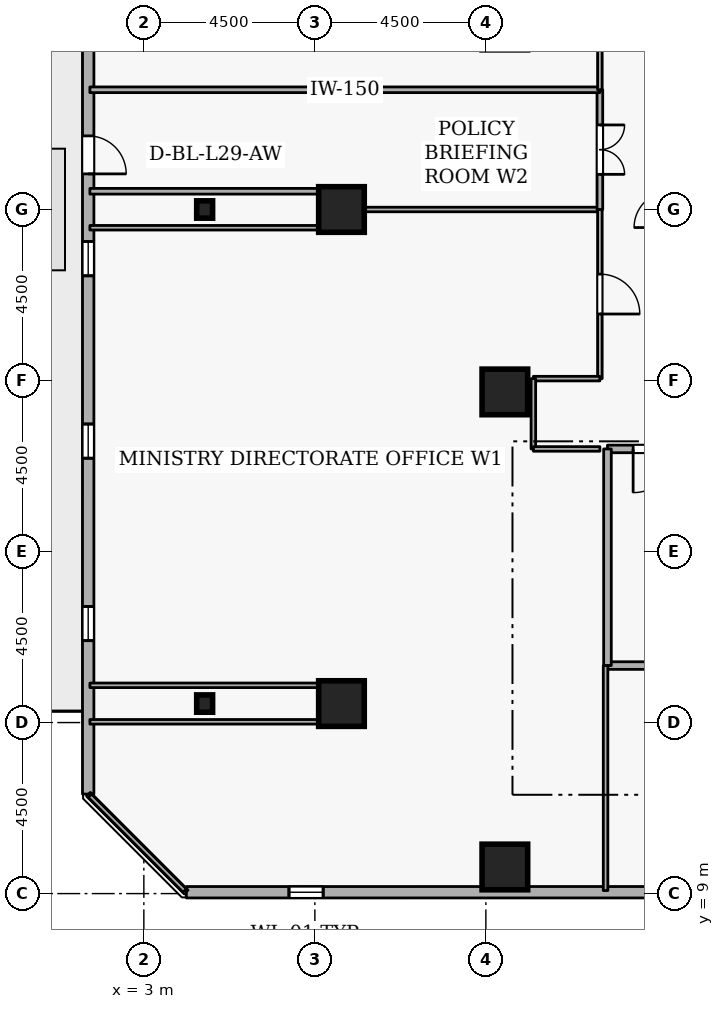
"""IFC4 building model, lengths in metres.
Left out: names, types, materials, properties, quantities, classifications, styles, units other than length and angle.
Written with IfcOpenShell. Run it as: python <this file> out.ifc"""

import sys

from ifc_helpers import new_model, si_unit, direction, frame, frame_2d, origin, origin_2d, place, context, subcontext, project, spatial, rectangle, i_section, extrude, element, fill, save


model = new_model("IFC4")
c1 = context("Model", 3, precision=1e-05, world=origin(), true_north=direction((0.0, 1.0)))
c2 = subcontext(c1, "Body", "Model", "MODEL_VIEW")
j1 = project(units=[si_unit("LENGTHUNIT", "METRE"), si_unit("PLANEANGLEUNIT", "RADIAN")], contexts=[c1])
p1 = place(None, origin())
s1 = spatial("IfcSite", under=j1, at=p1, CompositionType="ELEMENT")
p2 = place(p1, origin())
s2 = spatial("IfcBuilding", under=s1, at=p2, CompositionType="ELEMENT")
p3 = place(p2, frame((0.0, 0.0, 112.5)))
s3 = spatial("IfcBuildingStorey", under=s2, at=p3, CompositionType="ELEMENT", Elevation=112.5)
for number, where, z_axis, x_axis in (
    (1, (12.5, 9.7, 0.0), (0.0, 0.0, 1.0), (1.0, 0.0, 0.0)),
    (2, (8.2, 14.0, 0.0), (0.0, 0.0, 1.0), (1.0, 0.0, 0.0)),
    (3, (8.2, 27.0, 0.0), (0.0, 0.0, 1.0), (1.0, 0.0, 0.0)),
    (4, (12.5, 22.2, 0.0), (0.0, 0.0, 1.0), (1.0, 0.0, 0.0)),
):
    element("IfcColumn", number, at=place(p3, frame(where, z_axis=z_axis, x_axis=x_axis)), inside=s3, PredefinedType="COLUMN", context=c2, shape_type="SweptSolid", body=[
        extrude(rectangle(XDim=1.2, YDim=1.2, at=origin_2d()), origin(), (0.0, 0.0, 1.0), 3.6),
    ])
for number, where, z_axis, x_axis in (
    (5, (4.6, 14.0, 0.0), (0.0, 0.0, 1.0), (1.0, 0.0, 0.0)),
    (6, (4.6, 27.0, 0.0), (0.0, 0.0, 1.0), (1.0, 0.0, 0.0)),
):
    element("IfcColumn", number, at=place(p3, frame(where, z_axis=z_axis, x_axis=x_axis)), inside=s3, PredefinedType="COLUMN", context=c2, shape_type="SweptSolid", body=[
        extrude(i_section(OverallWidth=0.418, OverallDepth=0.456, WebThickness=0.042, FlangeThickness=0.067, FilletRadius=0.015, at=origin_2d()), origin(), (0.0, 0.0, 1.0), 3.6),
    ])
p4 = place(p3, frame((4.119, 9.035, 0.0), z_axis=(0.0, 0.0, 1.0), x_axis=(0.999999999641, 2.6801568e-05, 0.0)))
e7 = element("IfcWall", 7, at=p4, inside=s3, PredefinedType="STANDARD", context=c2, shape_type="SweptSolid", body=[
    extrude(rectangle(XDim=36.437, YDim=0.3, at=frame_2d((18.218, 0.0))), origin(), (0.0, 0.0, 1.0), 2.7),
])
p5 = place(p4, frame((2.7, 0.0, 0.72)))
e8 = element("IfcOpeningElement", 8, at=p5, cuts=e7, PredefinedType="OPENING", context=c2, shape_type="SweptSolid", body=[
    extrude(rectangle(XDim=0.9, YDim=1.75, at=frame_2d((0.45, 0.875))), frame((0.0, 0.16, 0.0), z_axis=(0.0, -1.0, 0.0), x_axis=(1.0, 0.0, 0.0)), (0.0, 0.0, 1.0), 0.32),
])
p6 = place(p4, frame((12.3, 0.0, 0.72)))
e9 = element("IfcOpeningElement", 9, at=p6, cuts=e7, PredefinedType="OPENING", context=c2, shape_type="SweptSolid", body=[
    extrude(rectangle(XDim=0.9, YDim=1.75, at=frame_2d((0.45, 0.875))), frame((0.0, 0.16, 0.0), z_axis=(0.0, -1.0, 0.0), x_axis=(1.0, 0.0, 0.0)), (0.0, 0.0, 1.0), 0.32),
])
p7 = place(p4, frame((17.1, 0.0, 0.72)))
e10 = element("IfcOpeningElement", 10, at=p7, cuts=e7, PredefinedType="OPENING", context=c2, shape_type="SweptSolid", body=[
    extrude(rectangle(XDim=0.9, YDim=1.75, at=frame_2d((0.45, 0.875))), frame((0.0, 0.16, 0.0), z_axis=(0.0, -1.0, 0.0), x_axis=(1.0, 0.0, 0.0)), (0.0, 0.0, 1.0), 0.32),
])
p8 = place(p4, frame((26.7, 0.0, 0.72)))
e11 = element("IfcOpeningElement", 11, at=p8, cuts=e7, PredefinedType="OPENING", context=c2, shape_type="SweptSolid", body=[
    extrude(rectangle(XDim=0.9, YDim=1.75, at=frame_2d((0.45, 0.875))), frame((0.0, 0.16, 0.0), z_axis=(0.0, -1.0, 0.0), x_axis=(1.0, 0.0, 0.0)), (0.0, 0.0, 1.0), 0.32),
])
p9 = place(p4, frame((31.5, 0.0, 0.72)))
e12 = element("IfcOpeningElement", 12, at=p9, cuts=e7, PredefinedType="OPENING", context=c2, shape_type="SweptSolid", body=[
    extrude(rectangle(XDim=0.9, YDim=1.75, at=frame_2d((0.45, 0.875))), frame((0.0, 0.16, 0.0), z_axis=(0.0, -1.0, 0.0), x_axis=(1.0, 0.0, 0.0)), (0.0, 0.0, 1.0), 0.32),
])
p10 = place(p3, frame((1.536, 48.055, 0.0), z_axis=(0.0, 0.0, 1.0), x_axis=(-2.6801568e-05, -0.999999999641, 0.0)))
e13 = element("IfcWall", 13, at=p10, inside=s3, PredefinedType="STANDARD", context=c2, shape_type="SweptSolid", body=[
    extrude(rectangle(XDim=36.437, YDim=0.3, at=frame_2d((18.218, 0.0))), origin(), (0.0, 0.0, 1.0), 2.7),
])
p11 = place(p10, frame((19.118, 0.0, 0.0)))
e14 = element("IfcOpeningElement", 14, at=p11, cuts=e13, PredefinedType="OPENING", context=c2, shape_type="SweptSolid", body=[
    extrude(rectangle(XDim=1.0, YDim=2.08, at=frame_2d((0.5, 1.04))), frame((0.0, 0.16, 0.0), z_axis=(0.0, -1.0, 0.0), x_axis=(1.0, 0.0, 0.0)), (0.0, 0.0, 1.0), 0.32),
])
p12 = place(p10, frame((2.7, 0.0, 0.72)))
e15 = element("IfcOpeningElement", 15, at=p12, cuts=e13, PredefinedType="OPENING", context=c2, shape_type="SweptSolid", body=[
    extrude(rectangle(XDim=0.9, YDim=1.75, at=frame_2d((0.45, 0.875))), frame((0.0, 0.16, 0.0), z_axis=(0.0, -1.0, 0.0), x_axis=(1.0, 0.0, 0.0)), (0.0, 0.0, 1.0), 0.32),
])
p13 = place(p10, frame((12.3, 0.0, 0.72)))
e16 = element("IfcOpeningElement", 16, at=p13, cuts=e13, PredefinedType="OPENING", context=c2, shape_type="SweptSolid", body=[
    extrude(rectangle(XDim=0.9, YDim=1.75, at=frame_2d((0.45, 0.875))), frame((0.0, 0.16, 0.0), z_axis=(0.0, -1.0, 0.0), x_axis=(1.0, 0.0, 0.0)), (0.0, 0.0, 1.0), 0.32),
])
p14 = place(p10, frame((21.9, 0.0, 0.72)))
e17 = element("IfcOpeningElement", 17, at=p14, cuts=e13, PredefinedType="OPENING", context=c2, shape_type="SweptSolid", body=[
    extrude(rectangle(XDim=0.9, YDim=1.75, at=frame_2d((0.45, 0.875))), frame((0.0, 0.16, 0.0), z_axis=(0.0, -1.0, 0.0), x_axis=(1.0, 0.0, 0.0)), (0.0, 0.0, 1.0), 0.32),
])
p15 = place(p10, frame((26.7, 0.0, 0.72)))
e18 = element("IfcOpeningElement", 18, at=p15, cuts=e13, PredefinedType="OPENING", context=c2, shape_type="SweptSolid", body=[
    extrude(rectangle(XDim=0.9, YDim=1.75, at=frame_2d((0.45, 0.875))), frame((0.0, 0.16, 0.0), z_axis=(0.0, -1.0, 0.0), x_axis=(1.0, 0.0, 0.0)), (0.0, 0.0, 1.0), 0.32),
])
p16 = place(p10, frame((31.5, 0.0, 0.72)))
e19 = element("IfcOpeningElement", 19, at=p16, cuts=e13, PredefinedType="OPENING", context=c2, shape_type="SweptSolid", body=[
    extrude(rectangle(XDim=0.9, YDim=1.75, at=frame_2d((0.45, 0.875))), frame((0.0, 0.16, 0.0), z_axis=(0.0, -1.0, 0.0), x_axis=(1.0, 0.0, 0.0)), (0.0, 0.0, 1.0), 0.32),
])
p17 = place(p3, frame((15.2, 15.0, 0.0), z_axis=(0.0, 0.0, 1.0), x_axis=(1.0, 0.0, 0.0)))
e20 = element("IfcWall", 20, at=p17, inside=s3, PredefinedType="STANDARD", context=c2, shape_type="SweptSolid", body=[
    extrude(rectangle(XDim=2.5, YDim=0.2, at=frame_2d((1.25, 0.0))), origin(), (0.0, 0.0, 1.0), 3.34),
])
p18 = place(p3, frame((17.7, 20.7, 0.0), z_axis=(0.0, 0.0, 1.0), x_axis=(-1.0, 0.0, 0.0)))
e21 = element("IfcWall", 21, at=p18, inside=s3, PredefinedType="STANDARD", context=c2, shape_type="SweptSolid", body=[
    extrude(rectangle(XDim=2.5, YDim=0.2, at=frame_2d((1.25, 0.0))), origin(), (0.0, 0.0, 1.0), 3.34),
])
p19 = place(p18, frame((0.675, 0.0, 0.0)))
e22 = element("IfcOpeningElement", 22, at=p19, cuts=e21, PredefinedType="OPENING", context=c2, shape_type="SweptSolid", body=[
    extrude(rectangle(XDim=1.15, YDim=2.1, at=frame_2d((0.575, 1.05))), frame((0.0, 0.11, 0.0), z_axis=(0.0, -1.0, 0.0), x_axis=(1.0, 0.0, 0.0)), (0.0, 0.0, 1.0), 0.22),
])
p20 = place(p3, frame((15.2, 20.7, 0.0), z_axis=(0.0, 0.0, 1.0), x_axis=(0.0, -1.0, 0.0)))
e23 = element("IfcWall", 23, at=p20, inside=s3, PredefinedType="STANDARD", context=c2, shape_type="SweptSolid", body=[
    extrude(rectangle(XDim=5.7, YDim=0.2, at=frame_2d((2.85, 0.0))), origin(), (0.0, 0.0, 1.0), 3.34),
])
for number, where, z_axis, x_axis in (
    (24, (1.58, 13.52, 0.0), (0.0, 0.0, 1.0), (1.0, 0.0, 0.0)),
    (25, (8.2, 14.48, 0.0), (0.0, 0.0, 1.0), (-1.0, 0.0, 0.0)),
    (26, (1.58, 26.52, 0.0), (0.0, 0.0, 1.0), (1.0, 0.0, 0.0)),
):
    element("IfcWall", number, at=place(p3, frame(where, z_axis=z_axis, x_axis=x_axis)), inside=s3, PredefinedType="PARTITIONING", context=c2, shape_type="SweptSolid", body=[
        extrude(rectangle(XDim=6.62, YDim=0.12, at=frame_2d((3.31, 0.0))), origin(), (0.0, 0.0, 1.0), 3.34),
    ])
p21 = place(p3, frame((8.2, 27.0, 0.0), z_axis=(0.0, 0.0, 1.0), x_axis=(1.0, 0.0, 0.0)))
e27 = element("IfcWall", 27, at=p21, inside=s3, PredefinedType="PARTITIONING", context=c2, shape_type="SweptSolid", body=[
    extrude(rectangle(XDim=6.8, YDim=0.12, at=frame_2d((3.4, 0.0))), origin(), (0.0, 0.0, 1.0), 2.882),
])
p22 = place(p3, frame((15.0, 27.0, 0.0), z_axis=(0.0, 0.0, 1.0), x_axis=(0.0, -1.0, 0.0)))
e28 = element("IfcWall", 28, at=p22, inside=s3, PredefinedType="PARTITIONING", context=c2, shape_type="SweptSolid", body=[
    extrude(rectangle(XDim=4.45, YDim=0.12, at=frame_2d((2.225, 0.0))), origin(), (0.0, 0.0, 1.0), 3.34),
])
p23 = place(p22, frame((1.7, 0.0, 0.0)))
e29 = element("IfcOpeningElement", 29, at=p23, cuts=e28, PredefinedType="OPENING", context=c2, shape_type="SweptSolid", body=[
    extrude(rectangle(XDim=1.05, YDim=2.1, at=frame_2d((0.525, 1.05))), frame((0.0, 0.07, 0.0), z_axis=(0.0, -1.0, 0.0), x_axis=(1.0, 0.0, 0.0)), (0.0, 0.0, 1.0), 0.14),
])
p24 = place(p3, frame((15.0, 22.55, 0.0), z_axis=(0.0, 0.0, 1.0), x_axis=(-1.0, 0.0, 0.0)))
e30 = element("IfcWall", 30, at=p24, inside=s3, PredefinedType="PARTITIONING", context=c2, shape_type="SweptSolid", body=[
    extrude(rectangle(XDim=1.75, YDim=0.12, at=frame_2d((0.875, 0.0))), origin(), (0.0, 0.0, 1.0), 3.34),
])
p25 = place(p3, frame((13.25, 22.55, 0.0), z_axis=(0.0, 0.0, 1.0), x_axis=(0.0, -1.0, 0.0)))
e31 = element("IfcWall", 31, at=p25, inside=s3, PredefinedType="PARTITIONING", context=c2, shape_type="SweptSolid", body=[
    extrude(rectangle(XDim=1.85, YDim=0.12, at=frame_2d((0.925, 0.0))), origin(), (0.0, 0.0, 1.0), 3.34),
])
p26 = place(p3, frame((13.25, 20.7, 0.0), z_axis=(0.0, 0.0, 1.0), x_axis=(1.0, 0.0, 0.0)))
e32 = element("IfcWall", 32, at=p26, inside=s3, PredefinedType="PARTITIONING", context=c2, shape_type="SweptSolid", body=[
    extrude(rectangle(XDim=1.75, YDim=0.12, at=frame_2d((0.875, 0.0))), origin(), (0.0, 0.0, 1.0), 3.34),
])
p27 = place(p3, frame((15.15, 15.0, 0.0), z_axis=(0.0, 0.0, 1.0), x_axis=(0.0, -1.0, 0.0)))
e33 = element("IfcWall", 33, at=p27, inside=s3, PredefinedType="PARTITIONING", context=c2, shape_type="SweptSolid", body=[
    extrude(rectangle(XDim=5.92, YDim=0.12, at=frame_2d((2.96, 0.0))), origin(), (0.0, 0.0, 1.0), 3.34),
])
p28 = place(p3, frame((4.075, 9.08, 0.0), z_axis=(0.0, 0.0, 1.0), x_axis=(-0.707106781187, 0.707106781187, 0.0)))
e34 = element("IfcWall", 34, at=p28, inside=s3, PredefinedType="PARTITIONING", context=c2, shape_type="SweptSolid", body=[
    extrude(rectangle(XDim=3.528, YDim=0.12, at=frame_2d((1.764, 0.0))), origin(), (0.0, 0.0, 1.0), 3.34),
])
p29 = place(p3, frame((15.0, 30.15, 0.0), z_axis=(0.0, 0.0, 1.0), x_axis=(0.0, -1.0, 0.0)))
e35 = element("IfcWall", 35, at=p29, inside=s3, PredefinedType="PARTITIONING", context=c2, shape_type="SweptSolid", body=[
    extrude(rectangle(XDim=3.15, YDim=0.15, at=frame_2d((1.575, 0.0))), origin(), (0.0, 0.0, 1.0), 3.34),
])
p30 = place(p29, frame((0.925, 0.0, 0.0)))
e36 = element("IfcOpeningElement", 36, at=p30, cuts=e35, PredefinedType="OPENING", context=c2, shape_type="SweptSolid", body=[
    extrude(rectangle(XDim=1.3, YDim=2.12, at=frame_2d((0.65, 1.06))), frame((0.0, 0.085, 0.0), z_axis=(0.0, -1.0, 0.0), x_axis=(1.0, 0.0, 0.0)), (0.0, 0.0, 1.0), 0.17),
])
p31 = place(p3, frame((8.2, 27.48, 0.0), z_axis=(0.0, 0.0, 1.0), x_axis=(-1.0, 0.0, 0.0)))
e37 = element("IfcWall", 37, at=p31, inside=s3, PredefinedType="PARTITIONING", context=c2, shape_type="SweptSolid", body=[
    extrude(rectangle(XDim=6.62, YDim=0.15, at=frame_2d((3.31, 0.0))), origin(), (0.0, 0.0, 1.0), 3.34),
])
p32 = place(p3, frame((1.58, 30.15, 0.0), z_axis=(0.0, 0.0, 1.0), x_axis=(1.0, 0.0, 0.0)))
e38 = element("IfcWall", 38, at=p32, inside=s3, PredefinedType="PARTITIONING", context=c2, shape_type="SweptSolid", body=[
    extrude(rectangle(XDim=13.42, YDim=0.15, at=frame_2d((6.71, 0.0))), origin(), (0.0, 0.0, 1.0), 3.34),
])
p33 = place(p3, frame((15.0, 31.45, 0.0), z_axis=(0.0, 0.0, 1.0), x_axis=(0.0, -1.0, 0.0)))
e39 = element("IfcWall", 39, at=p33, inside=s3, PredefinedType="PARTITIONING", context=c2, shape_type="SweptSolid", body=[
    extrude(rectangle(XDim=1.3, YDim=0.12, at=frame_2d((0.65, 0.0))), origin(), (0.0, 0.0, 1.0), 3.34),
])
p34 = place(p5, origin())
e40 = element("IfcWindow", 40, at=p34, inside=s3, PartitioningType="SINGLE_PANEL", PredefinedType="WINDOW", context=c2, shape_type="SweptSolid", body=[
    extrude(rectangle(XDim=0.9, YDim=1.75, at=frame_2d((0.45, 0.875))), frame((0.0, 0.03, 0.0), z_axis=(0.0, -1.0, 0.0), x_axis=(1.0, 0.0, 0.0)), (0.0, 0.0, 1.0), 0.06),
])
fill(e8, e40)
p35 = place(p11, origin())
e41 = element("IfcDoor", 41, at=p35, inside=s3, OperationType="SINGLE_SWING_RIGHT", PredefinedType="DOOR", context=c2, shape_type="SweptSolid", body=[
    extrude(rectangle(XDim=1.0, YDim=2.08, at=frame_2d((0.5, 1.04))), frame((0.0, 0.025, 0.0), z_axis=(0.0, -1.0, 0.0), x_axis=(1.0, 0.0, 0.0)), (0.0, 0.0, 1.0), 0.05),
])
fill(e14, e41)
p36 = place(p14, origin())
e42 = element("IfcWindow", 42, at=p36, inside=s3, PartitioningType="SINGLE_PANEL", PredefinedType="WINDOW", context=c2, shape_type="SweptSolid", body=[
    extrude(rectangle(XDim=0.9, YDim=1.75, at=frame_2d((0.45, 0.875))), frame((0.0, 0.03, 0.0), z_axis=(0.0, -1.0, 0.0), x_axis=(1.0, 0.0, 0.0)), (0.0, 0.0, 1.0), 0.06),
])
fill(e17, e42)
p37 = place(p15, origin())
e43 = element("IfcWindow", 43, at=p37, inside=s3, PartitioningType="SINGLE_PANEL", PredefinedType="WINDOW", context=c2, shape_type="SweptSolid", body=[
    extrude(rectangle(XDim=0.9, YDim=1.75, at=frame_2d((0.45, 0.875))), frame((0.0, 0.03, 0.0), z_axis=(0.0, -1.0, 0.0), x_axis=(1.0, 0.0, 0.0)), (0.0, 0.0, 1.0), 0.06),
])
fill(e18, e43)
p38 = place(p16, origin())
e44 = element("IfcWindow", 44, at=p38, inside=s3, PartitioningType="SINGLE_PANEL", PredefinedType="WINDOW", context=c2, shape_type="SweptSolid", body=[
    extrude(rectangle(XDim=0.9, YDim=1.75, at=frame_2d((0.45, 0.875))), frame((0.0, 0.03, 0.0), z_axis=(0.0, -1.0, 0.0), x_axis=(1.0, 0.0, 0.0)), (0.0, 0.0, 1.0), 0.06),
])
fill(e19, e44)
p39 = place(p19, origin())
e45 = element("IfcDoor", 45, at=p39, inside=s3, OperationType="SINGLE_SWING_RIGHT", PredefinedType="DOOR", context=c2, shape_type="SweptSolid", body=[
    extrude(rectangle(XDim=1.15, YDim=2.1, at=frame_2d((0.575, 1.05))), frame((0.0, 0.025, 0.0), z_axis=(0.0, -1.0, 0.0), x_axis=(1.0, 0.0, 0.0)), (0.0, 0.0, 1.0), 0.05),
])
fill(e22, e45)
p40 = place(p23, origin())
e46 = element("IfcDoor", 46, at=p40, inside=s3, OperationType="SINGLE_SWING_RIGHT", PredefinedType="DOOR", context=c2, shape_type="SweptSolid", body=[
    extrude(rectangle(XDim=1.05, YDim=2.1, at=frame_2d((0.525, 1.05))), frame((0.0, 0.025, 0.0), z_axis=(0.0, -1.0, 0.0), x_axis=(1.0, 0.0, 0.0)), (0.0, 0.0, 1.0), 0.05),
])
fill(e29, e46)
p41 = place(p30, origin())
e47 = element("IfcDoor", 47, at=p41, inside=s3, OperationType="DOUBLE_DOOR_SINGLE_SWING", PredefinedType="DOOR", context=c2, shape_type="SweptSolid", body=[
    extrude(rectangle(XDim=1.3, YDim=2.12, at=frame_2d((0.65, 1.06))), frame((0.0, 0.025, 0.0), z_axis=(0.0, -1.0, 0.0), x_axis=(1.0, 0.0, 0.0)), (0.0, 0.0, 1.0), 0.05),
])
fill(e36, e47)
save(model, sys.argv[1])
